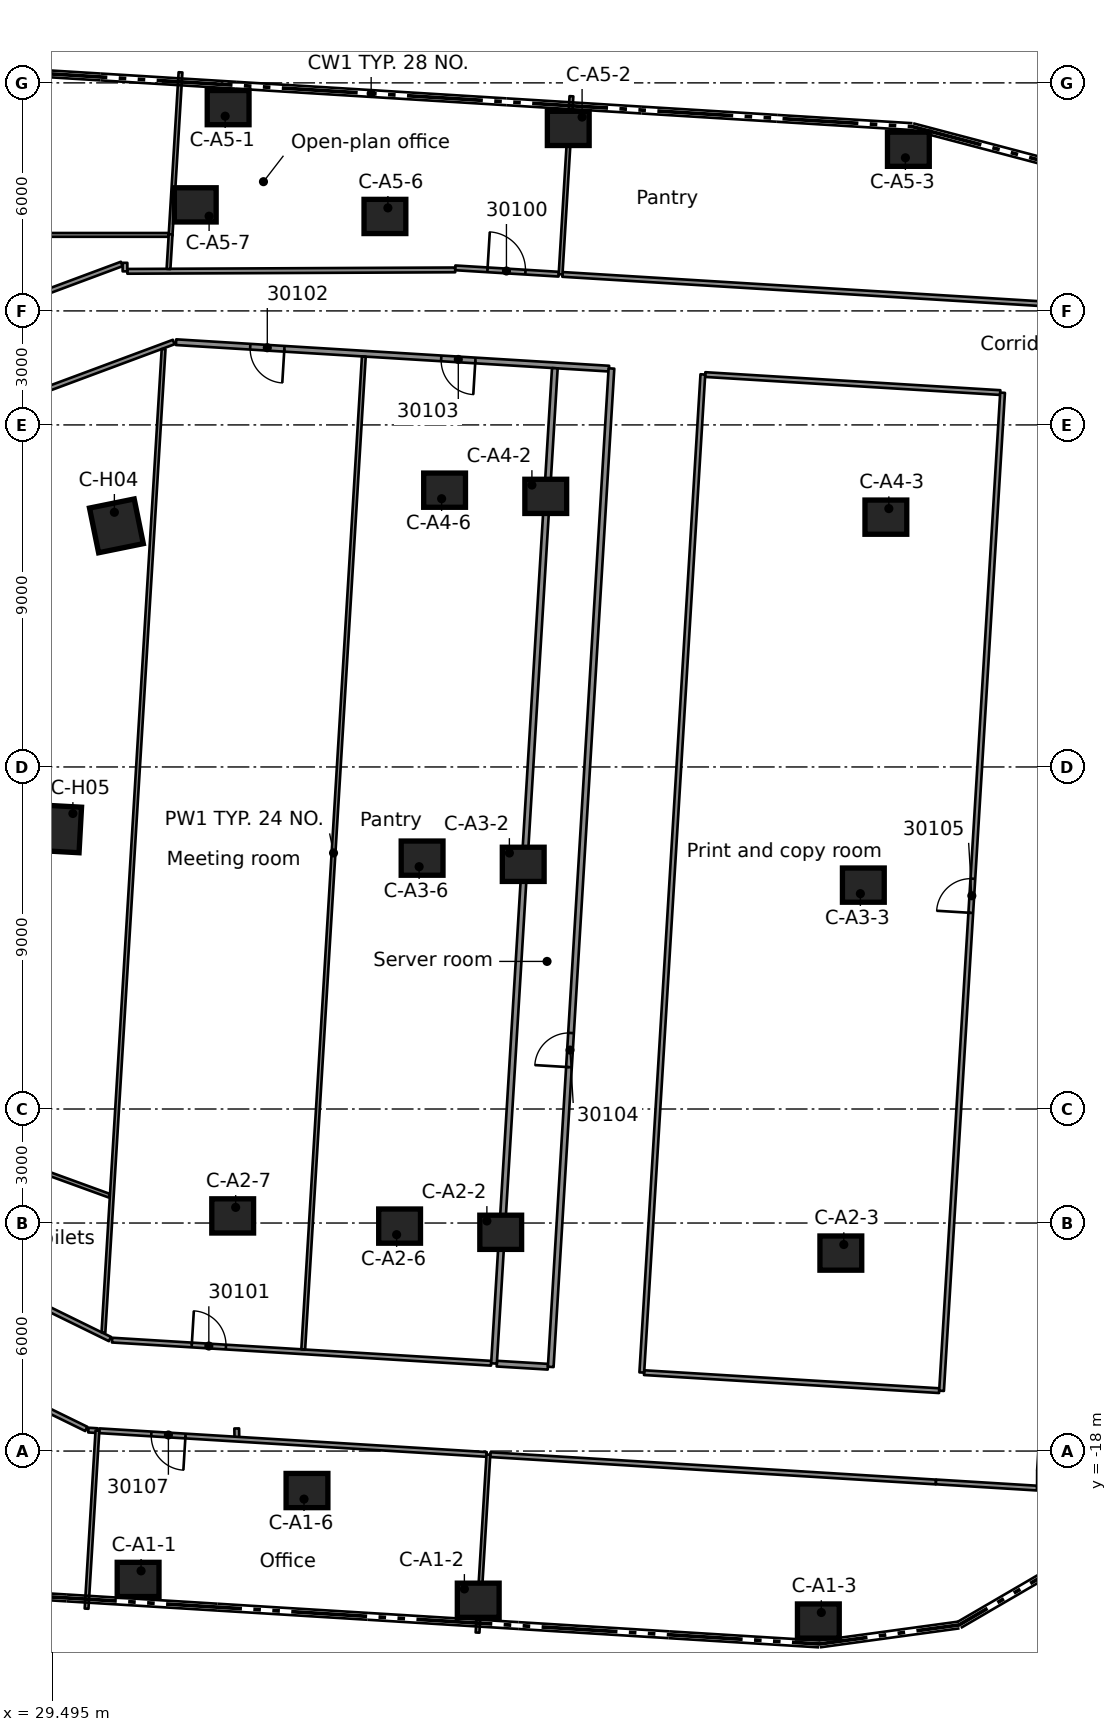
"""IFC4 building model, lengths in metres.
Left out: names, types, materials, properties, quantities, classifications, styles, units other than length and angle.
Written with IfcOpenShell. Run it as: python <this file> out.ifc"""

import sys

from ifc_helpers import new_model, si_unit, direction, frame, frame_2d, origin, origin_2d, place, context, subcontext, project, spatial, rectangle, extrude, element, fill, save


model = new_model("IFC4")
c1 = context("Model", 3, precision=1e-05, world=origin(), true_north=direction((0.0, 1.0)))
c2 = subcontext(c1, "Body", "Model", "MODEL_VIEW")
j1 = project(units=[si_unit("LENGTHUNIT", "METRE"), si_unit("PLANEANGLEUNIT", "RADIAN")], contexts=[c1])
p1 = place(None, origin())
s1 = spatial("IfcSite", under=j1, at=p1, CompositionType="ELEMENT")
p2 = place(p1, origin())
s2 = spatial("IfcBuilding", under=s1, at=p2, CompositionType="ELEMENT")
p3 = place(p2, frame((0.0, 0.0, 152.6)))
s3 = spatial("IfcBuildingStorey", under=s2, at=p3, CompositionType="ELEMENT", Elevation=152.6)
for number, where, z_axis, x_axis in (
    (1, (31.754, -21.378, 0.0), (0.0, 0.0, 1.0), (1.0, 0.0, 0.0)),
    (2, (40.704, -21.926, 0.0), (0.0, 0.0, 1.0), (1.0, 0.0, 0.0)),
    (3, (49.654, -22.473, 0.0), (0.0, 0.0, 1.0), (1.0, 0.0, 0.0)),
    (4, (36.198, -19.039, 0.0), (0.0, 0.0, 1.0), (1.0, 0.0, 0.0)),
    (5, (41.296, -12.244, 0.0), (0.0, 0.0, 1.0), (1.0, 0.0, 0.0)),
    (6, (50.246, -12.791, 0.0), (0.0, 0.0, 1.0), (1.0, 0.0, 0.0)),
    (7, (38.635, -12.081, 0.0), (0.0, 0.0, 1.0), (1.0, 0.0, 0.0)),
    (8, (34.243, -11.813, 0.0), (0.0, 0.0, 1.0), (1.0, 0.0, 0.0)),
    (9, (41.888, -2.562, 0.0), (0.0, 0.0, 1.0), (1.0, 0.0, 0.0)),
    (10, (50.838, -3.109, 0.0), (0.0, 0.0, 1.0), (1.0, 0.0, 0.0)),
    (11, (39.227, -2.399, 0.0), (0.0, 0.0, 1.0), (1.0, 0.0, 0.0)),
    (12, (42.481, 7.12, 0.0), (0.0, 0.0, 1.0), (1.0, 0.0, 0.0)),
    (13, (51.431, 6.573, 0.0), (0.0, 0.0, 1.0), (1.0, 0.0, 0.0)),
    (14, (39.819, 7.283, 0.0), (0.0, 0.0, 1.0), (1.0, 0.0, 0.0)),
    (15, (34.123, 17.349, 0.0), (0.0, 0.0, 1.0), (1.0, 0.0, 0.0)),
    (16, (43.073, 16.802, 0.0), (0.0, 0.0, 1.0), (1.0, 0.0, 0.0)),
    (17, (52.023, 16.254, 0.0), (0.0, 0.0, 1.0), (1.0, 0.0, 0.0)),
    (18, (38.249, 14.485, 0.0), (0.0, 0.0, 1.0), (1.0, 0.0, 0.0)),
    (19, (33.258, 14.79, 0.0), (0.0, 0.0, 1.0), (1.0, 0.0, 0.0)),
):
    element("IfcColumn", number, at=place(p3, frame(where, z_axis=z_axis, x_axis=x_axis)), inside=s3, PredefinedType="COLUMN", context=c2, shape_type="SweptSolid", body=[
        extrude(rectangle(XDim=1.1, YDim=0.9, at=origin_2d()), origin(), (0.0, 0.0, 1.0), 3.5),
    ])
for number, where, z_axis, x_axis in (
    (20, (31.183, 6.344, 0.0), (0.0, 0.0, 1.0), (0.98, 0.199, 0.0)),
    (21, (29.634, -1.625, 0.0), (0.0, 0.0, 1.0), (0.998, -0.055, 0.0)),
):
    element("IfcColumn", number, at=place(p3, frame(where, z_axis=z_axis, x_axis=x_axis)), inside=s3, PredefinedType="COLUMN", context=c2, shape_type="SweptSolid", body=[
        extrude(rectangle(XDim=1.2, YDim=1.2, at=origin_2d()), origin(), (0.0, 0.0, 1.0), 3.5),
    ])
p4 = place(p3, frame((34.349, -17.405, 0.0), z_axis=(0.0, 0.0, 1.0), x_axis=(0.017313421844, -0.999850111479, 0.0)))
e22 = element("IfcWall", 22, at=p4, inside=s3, PredefinedType="PARTITIONING", context=c2, shape_type="SweptSolid", body=[
    extrude(rectangle(XDim=0.282, YDim=0.125, at=frame_2d((0.141, 0.0))), origin(), (0.0, 0.0, 1.0), 3.08),
])
p5 = place(p3, frame((26.052, -15.294, 0.0), z_axis=(0.0, 0.0, 1.0), x_axis=(0.898165349965, -0.43965782618, 0.0)))
e23 = element("IfcWall", 23, at=p5, inside=s3, PredefinedType="PARTITIONING", context=c2, shape_type="SweptSolid", body=[
    extrude(rectangle(XDim=4.831, YDim=0.125, at=frame_2d((2.416, 0.0))), origin(), (0.0, 0.0, 1.0), 3.08),
])
p6 = place(p3, frame((31.014, -15.053, 0.0), z_axis=(0.0, 0.0, 1.0), x_axis=(-0.897926088568, 0.440146270538, 0.0)))
e24 = element("IfcWall", 24, at=p6, inside=s3, PredefinedType="PARTITIONING", context=c2, shape_type="SweptSolid", body=[
    extrude(rectangle(XDim=5.289, YDim=0.125, at=frame_2d((2.645, 0.0))), origin(), (0.0, 0.0, 1.0), 3.08),
])
p7 = place(p3, frame((22.131, -8.055, 0.0), z_axis=(0.0, 0.0, 1.0), x_axis=(0.939701226618, -0.341996498071, 0.0)))
e25 = element("IfcWall", 25, at=p7, inside=s3, PredefinedType="PARTITIONING", context=c2, shape_type="SweptSolid", body=[
    extrude(rectangle(XDim=9.436, YDim=0.1, at=frame_2d((4.718, 0.0))), origin(), (0.0, 0.0, 1.0), 3.08),
])
p8 = place(p3, frame((30.445, -17.448, 0.0), z_axis=(0.0, 0.0, 1.0), x_axis=(0.998064460788, -0.062187877536, 0.0)))
e26 = element("IfcWall", 26, at=p8, inside=s3, PredefinedType="PARTITIONING", context=c2, shape_type="SweptSolid", body=[
    extrude(rectangle(XDim=0.24, YDim=0.125, at=frame_2d((0.12, 0.0))), origin(), (0.0, 0.0, 1.0), 3.08),
])
p9 = place(p3, frame((41.022, -18.095, 0.0), z_axis=(0.0, 0.0, 1.0), x_axis=(0.998124844779, -0.06121106301, 0.0)))
e27 = element("IfcWall", 27, at=p9, inside=s3, PredefinedType="PARTITIONING", context=c2, shape_type="SweptSolid", body=[
    extrude(rectangle(XDim=11.746, YDim=0.125, at=frame_2d((5.873, 0.0))), origin(), (0.0, 0.0, 1.0), 3.08),
])
p10 = place(p3, frame((52.75, -18.812, 0.0), z_axis=(0.0, 0.0, 1.0), x_axis=(0.998124296611, -0.061220000931, 0.0)))
e28 = element("IfcWall", 28, at=p10, inside=s3, PredefinedType="PARTITIONING", context=c2, shape_type="SweptSolid", body=[
    extrude(rectangle(XDim=2.664, YDim=0.125, at=frame_2d((1.332, 0.0))), origin(), (0.0, 0.0, 1.0), 3.08),
])
p11 = place(p3, frame((40.923, -18.089, 0.0), z_axis=(0.0, 0.0, 1.0), x_axis=(-0.998135704692, 0.06103372034, 0.0)))
e29 = element("IfcWall", 29, at=p11, inside=s3, PredefinedType="PARTITIONING", context=c2, shape_type="SweptSolid", body=[
    extrude(rectangle(XDim=10.208, YDim=0.125, at=frame_2d((5.104, 0.0))), origin(), (0.0, 0.0, 1.0), 3.08),
])
p12 = place(p11, frame((7.938, 0.0, 0.0)))
e30 = element("IfcOpeningElement", 30, at=p12, cuts=e29, PredefinedType="OPENING", context=c2, shape_type="SweptSolid", body=[
    extrude(rectangle(XDim=0.9, YDim=2.1, at=frame_2d((0.45, 1.05))), frame((0.0, 0.073, 0.0), z_axis=(0.0, -1.0, 0.0), x_axis=(1.0, 0.0, 0.0)), (0.0, 0.0, 1.0), 0.145),
])
p13 = place(p3, frame((41.194, -15.7, 0.0), z_axis=(0.0, 0.0, 1.0), x_axis=(0.998183738246, -0.060243046918, 0.0)))
e31 = element("IfcWall", 31, at=p13, inside=s3, PredefinedType="PARTITIONING", context=c2, shape_type="SweptSolid", body=[
    extrude(rectangle(XDim=1.345, YDim=0.15, at=frame_2d((0.673, 0.0))), origin(), (0.0, 0.0, 1.0), 3.08),
])
p14 = place(p3, frame((31.07, -15.081, 0.0), z_axis=(0.0, 0.0, 1.0), x_axis=(0.998141754277, -0.060934705778, 0.0)))
e32 = element("IfcWall", 32, at=p14, inside=s3, PredefinedType="PARTITIONING", context=c2, shape_type="SweptSolid", body=[
    extrude(rectangle(XDim=9.992, YDim=0.125, at=frame_2d((4.996, 0.0))), origin(), (0.0, 0.0, 1.0), 3.08),
])
p15 = place(p14, frame((2.1, 0.0, 0.0)))
e33 = element("IfcOpeningElement", 33, at=p15, cuts=e32, PredefinedType="OPENING", context=c2, shape_type="SweptSolid", body=[
    extrude(rectangle(XDim=0.9, YDim=2.1, at=frame_2d((0.45, 1.05))), frame((0.0, 0.073, 0.0), z_axis=(0.0, -1.0, 0.0), x_axis=(1.0, 0.0, 0.0)), (0.0, 0.0, 1.0), 0.145),
])
p16 = place(p3, frame((45.07, -15.937, 0.0), z_axis=(0.0, 0.0, 1.0), x_axis=(0.998142502844, -0.060922442628, 0.0)))
e34 = element("IfcWall", 34, at=p16, inside=s3, PredefinedType="PARTITIONING", context=c2, shape_type="SweptSolid", body=[
    extrude(rectangle(XDim=7.778, YDim=0.125, at=frame_2d((3.889, 0.0))), origin(), (0.0, 0.0, 1.0), 3.08),
])
p17 = place(p3, frame((44.145, 10.481, 0.0), z_axis=(0.0, 0.0, 1.0), x_axis=(-0.998138667877, 0.06098524157, 0.0)))
e35 = element("IfcWall", 35, at=p17, inside=s3, PredefinedType="PARTITIONING", context=c2, shape_type="SweptSolid", body=[
    extrude(rectangle(XDim=11.413, YDim=0.15, at=frame_2d((5.707, 0.0))), origin(), (0.0, 0.0, 1.0), 3.08),
])
p18 = place(p17, frame((8.558, 0.0, 0.0)))
e36 = element("IfcOpeningElement", 36, at=p18, cuts=e35, PredefinedType="OPENING", context=c2, shape_type="SweptSolid", body=[
    extrude(rectangle(XDim=0.9, YDim=2.1, at=frame_2d((0.45, 1.05))), frame((0.0, 0.085, 0.0), z_axis=(0.0, -1.0, 0.0), x_axis=(1.0, 0.0, 0.0)), (0.0, 0.0, 1.0), 0.17),
])
p19 = place(p17, frame((3.523, 0.0, 0.0)))
e37 = element("IfcOpeningElement", 37, at=p19, cuts=e35, PredefinedType="OPENING", context=c2, shape_type="SweptSolid", body=[
    extrude(rectangle(XDim=0.9, YDim=2.1, at=frame_2d((0.45, 1.05))), frame((0.0, 0.085, 0.0), z_axis=(0.0, -1.0, 0.0), x_axis=(1.0, 0.0, 0.0)), (0.0, 0.0, 1.0), 0.17),
])
p20 = place(p3, frame((46.677, 10.325, 0.0), z_axis=(0.0, 0.0, 1.0), x_axis=(0.998142036778, -0.060930078101, 0.0)))
e38 = element("IfcWall", 38, at=p20, inside=s3, PredefinedType="PARTITIONING", context=c2, shape_type="SweptSolid", body=[
    extrude(rectangle(XDim=7.777, YDim=0.125, at=frame_2d((3.889, 0.0))), origin(), (0.0, 0.0, 1.0), 3.08),
])
p21 = place(p3, frame((42.921, 12.96, 0.0), z_axis=(0.0, 0.0, 1.0), x_axis=(0.998135679052, -0.061034139647, 0.0)))
e39 = element("IfcWall", 39, at=p21, inside=s3, PredefinedType="PARTITIONING", context=c2, shape_type="SweptSolid", body=[
    extrude(rectangle(XDim=13.468, YDim=0.125, at=frame_2d((6.734, 0.0))), origin(), (0.0, 0.0, 1.0), 3.08),
])
p22 = place(p3, frame((40.099, 13.133, 0.0), z_axis=(0.0, 0.0, 1.0), x_axis=(0.998123336101, -0.061235658973, 0.0)))
e40 = element("IfcWall", 40, at=p22, inside=s3, PredefinedType="PARTITIONING", context=c2, shape_type="SweptSolid", body=[
    extrude(rectangle(XDim=2.727, YDim=0.125, at=frame_2d((1.364, 0.0))), origin(), (0.0, 0.0, 1.0), 3.08),
])
p23 = place(p22, frame((0.85, 0.0, 0.0)))
e41 = element("IfcOpeningElement", 41, at=p23, cuts=e40, PredefinedType="OPENING", context=c2, shape_type="SweptSolid", body=[
    extrude(rectangle(XDim=1.0, YDim=2.1, at=frame_2d((0.5, 1.05))), frame((0.0, 0.073, 0.0), z_axis=(0.0, -1.0, 0.0), x_axis=(1.0, 0.0, 0.0)), (0.0, 0.0, 1.0), 0.145),
])
p24 = place(p3, frame((31.471, 13.041, 0.0), z_axis=(0.0, 0.0, 1.0), x_axis=(0.999990255084, 0.004414718129, 0.0)))
e42 = element("IfcWall", 42, at=p24, inside=s3, PredefinedType="PARTITIONING", context=c2, shape_type="SweptSolid", body=[
    extrude(rectangle(XDim=8.627, YDim=0.125, at=frame_2d((4.313, 0.0))), origin(), (0.0, 0.0, 1.0), 3.08),
])
p25 = place(p3, frame((22.113, 14.0, 0.0), z_axis=(0.0, 0.0, 1.0), x_axis=(1.0, 0.0, 0.0)))
e43 = element("IfcWall", 43, at=p25, inside=s3, PredefinedType="PARTITIONING", context=c2, shape_type="SweptSolid", body=[
    extrude(rectangle(XDim=10.446, YDim=0.1, at=frame_2d((5.223, 0.0))), origin(), (0.0, 0.0, 1.0), 3.08),
])
p26 = place(p3, frame((25.833, 8.63, 0.0), z_axis=(0.0, 0.0, 1.0), x_axis=(0.93725557741, 0.348643059037, 0.0)))
e44 = element("IfcWall", 44, at=p26, inside=s3, PredefinedType="PARTITIONING", context=c2, shape_type="SweptSolid", body=[
    extrude(rectangle(XDim=7.317, YDim=0.125, at=frame_2d((3.658, 0.0))), origin(), (0.0, 0.0, 1.0), 3.08),
])
p27 = place(p3, frame((25.742, 11.158, 0.0), z_axis=(0.0, 0.0, 1.0), x_axis=(0.937195672542, 0.348804058705, 0.0)))
e45 = element("IfcWall", 45, at=p27, inside=s3, PredefinedType="PARTITIONING", context=c2, shape_type="SweptSolid", body=[
    extrude(rectangle(XDim=5.955, YDim=0.125, at=frame_2d((2.978, 0.0))), origin(), (0.0, 0.0, 1.0), 3.08),
])
p28 = place(p3, frame((57.311, 11.514, 0.0), z_axis=(0.0, 0.0, 1.0), x_axis=(-0.061067487699, -0.998133639322, 0.0)))
e46 = element("IfcWall", 46, at=p28, inside=s3, PredefinedType="PARTITIONING", context=c2, shape_type="SweptSolid", body=[
    extrude(rectangle(XDim=30.08, YDim=0.125, at=frame_2d((15.04, 0.0))), origin(), (0.0, 0.0, 1.0), 3.08),
])
p29 = place(p28, frame((14.435, 0.0, 0.0)))
e47 = element("IfcOpeningElement", 47, at=p29, cuts=e46, PredefinedType="OPENING", context=c2, shape_type="SweptSolid", body=[
    extrude(rectangle(XDim=0.9, YDim=2.1, at=frame_2d((0.45, 1.05))), frame((0.0, 0.073, 0.0), z_axis=(0.0, -1.0, 0.0), x_axis=(1.0, 0.0, 0.0)), (0.0, 0.0, 1.0), 0.145),
])
p30 = place(p3, frame((52.896, -16.415, 0.0), z_axis=(0.0, 0.0, 1.0), x_axis=(0.061037428755, 0.998135477924, 0.0)))
e48 = element("IfcWall", 48, at=p30, inside=s3, PredefinedType="PARTITIONING", context=c2, shape_type="SweptSolid", body=[
    extrude(rectangle(XDim=26.311, YDim=0.125, at=frame_2d((13.156, 0.0))), origin(), (0.0, 0.0, 1.0), 3.08),
])
p31 = place(p30, frame((12.6, 0.0, 0.0)))
e49 = element("IfcOpeningElement", 49, at=p31, cuts=e48, PredefinedType="OPENING", context=c2, shape_type="SweptSolid", body=[
    extrude(rectangle(XDim=0.9, YDim=2.1, at=frame_2d((0.45, 1.05))), frame((0.0, 0.073, 0.0), z_axis=(0.0, -1.0, 0.0), x_axis=(1.0, 0.0, 0.0)), (0.0, 0.0, 1.0), 0.145),
])
p32 = place(p3, frame((45.008, -15.933, 0.0), z_axis=(0.0, 0.0, 1.0), x_axis=(0.061073840806, 0.998133250608, 0.0)))
e50 = element("IfcWall", 50, at=p32, inside=s3, PredefinedType="PARTITIONING", context=c2, shape_type="SweptSolid", body=[
    extrude(rectangle(XDim=26.311, YDim=0.125, at=frame_2d((13.156, 0.0))), origin(), (0.0, 0.0, 1.0), 3.08),
])
p33 = place(p3, frame((42.612, -15.786, 0.0), z_axis=(0.0, 0.0, 1.0), x_axis=(0.060711547525, 0.998155352637, 0.0)))
e51 = element("IfcWall", 51, at=p33, inside=s3, PredefinedType="PARTITIONING", context=c2, shape_type="SweptSolid", body=[
    extrude(rectangle(XDim=26.32, YDim=0.15, at=frame_2d((13.16, 0.0))), origin(), (0.0, 0.0, 1.0), 3.08),
])
p34 = place(p33, frame((7.902, 0.0, 0.0)))
e52 = element("IfcOpeningElement", 52, at=p34, cuts=e51, PredefinedType="OPENING", context=c2, shape_type="SweptSolid", body=[
    extrude(rectangle(XDim=0.9, YDim=2.1, at=frame_2d((0.45, 1.05))), frame((0.0, 0.085, 0.0), z_axis=(0.0, -1.0, 0.0), x_axis=(1.0, 0.0, 0.0)), (0.0, 0.0, 1.0), 0.17),
])
p35 = place(p3, frame((40.686, -22.776, 0.0), z_axis=(0.0, 0.0, 1.0), x_axis=(0.060923886766, 0.998142414699, 0.0)))
e53 = element("IfcWall", 53, at=p35, inside=s3, PredefinedType="PARTITIONING", context=c2, shape_type="SweptSolid", body=[
    extrude(rectangle(XDim=4.693, YDim=0.1, at=frame_2d((2.346, 0.0))), origin(), (0.0, 0.0, 1.0), 3.08),
])
p36 = place(p3, frame((41.119, -15.695, 0.0), z_axis=(0.0, 0.0, 1.0), x_axis=(0.061026057913, 0.998136173203, 0.0)))
e54 = element("IfcWall", 54, at=p36, inside=s3, PredefinedType="PARTITIONING", context=c2, shape_type="SweptSolid", body=[
    extrude(rectangle(XDim=26.236, YDim=0.15, at=frame_2d((13.118, 0.0))), origin(), (0.0, 0.0, 1.0), 3.08),
])
p37 = place(p3, frame((42.871, 12.963, 0.0), z_axis=(0.0, 0.0, 1.0), x_axis=(0.0609080718, 0.998143379876, 0.0)))
e55 = element("IfcWall", 55, at=p37, inside=s3, PredefinedType="PARTITIONING", context=c2, shape_type="SweptSolid", body=[
    extrude(rectangle(XDim=4.694, YDim=0.1, at=frame_2d((2.347, 0.0))), origin(), (0.0, 0.0, 1.0), 3.08),
])
p38 = place(p3, frame((36.099, -15.326, 0.0), z_axis=(0.0, 0.0, 1.0), x_axis=(0.060935779655, 0.998141688719, 0.0)))
e56 = element("IfcWall", 56, at=p38, inside=s3, PredefinedType="PARTITIONING", context=c2, shape_type="SweptSolid", body=[
    extrude(rectangle(XDim=26.175, YDim=0.1, at=frame_2d((13.087, 0.0))), origin(), (0.0, 0.0, 1.0), 3.08),
])
p39 = place(p3, frame((30.398, -22.147, 0.0), z_axis=(0.0, 0.0, 1.0), x_axis=(0.060972554319, 0.998139442974, 0.0)))
e57 = element("IfcWall", 57, at=p39, inside=s3, PredefinedType="PARTITIONING", context=c2, shape_type="SweptSolid", body=[
    extrude(rectangle(XDim=4.693, YDim=0.1, at=frame_2d((2.346, 0.0))), origin(), (0.0, 0.0, 1.0), 3.08),
])
p40 = place(p3, frame((30.842, -14.879, 0.0), z_axis=(0.0, 0.0, 1.0), x_axis=(0.061072336712, 0.998133342639, 0.0)))
e58 = element("IfcWall", 58, at=p40, inside=s3, PredefinedType="PARTITIONING", context=c2, shape_type="SweptSolid", body=[
    extrude(rectangle(XDim=25.92, YDim=0.1, at=frame_2d((12.96, 0.0))), origin(), (0.0, 0.0, 1.0), 3.08),
])
p41 = place(p3, frame((32.608, 13.985, 0.0), z_axis=(0.0, 0.0, 1.0), x_axis=(0.060978462691, 0.998139082036, 0.0)))
e59 = element("IfcWall", 59, at=p41, inside=s3, PredefinedType="PARTITIONING", context=c2, shape_type="SweptSolid", body=[
    extrude(rectangle(XDim=4.3, YDim=0.1, at=frame_2d((2.15, 0.0))), origin(), (0.0, 0.0, 1.0), 3.08),
])
p42 = place(p3, frame((32.554, 13.103, 0.0), z_axis=(0.0, 0.0, 1.0), x_axis=(0.061463226288, 0.998109348626, 0.0)))
e60 = element("IfcWall", 60, at=p42, inside=s3, PredefinedType="PARTITIONING", context=c2, shape_type="SweptSolid", body=[
    extrude(rectangle(XDim=0.914, YDim=0.1, at=frame_2d((0.457, 0.0))), origin(), (0.0, 0.0, 1.0), 3.08),
])
p43 = place(p3, frame((55.472, -18.978, 0.0), z_axis=(0.0, 0.0, 1.0), x_axis=(0.004694783941, 0.999988979441, 0.0)))
e61 = element("IfcWall", 61, at=p43, inside=s3, PredefinedType="PARTITIONING", context=c2, shape_type="SweptSolid", body=[
    extrude(rectangle(XDim=0.468, YDim=0.125, at=frame_2d((0.234, 0.0))), origin(), (0.0, 0.0, 1.0), 3.08),
])
p44 = place(p3, frame((31.409, 13.041, 0.0), z_axis=(0.0, 0.0, 1.0), x_axis=(0.0, 1.0, 0.0)))
e62 = element("IfcWall", 62, at=p44, inside=s3, PredefinedType="PARTITIONING", context=c2, shape_type="SweptSolid", body=[
    extrude(rectangle(XDim=0.224, YDim=0.125, at=frame_2d((0.112, 0.0))), origin(), (0.0, 0.0, 1.0), 3.08),
])
p45 = place(p23, origin())
e63 = element("IfcDoor", 63, at=p45, inside=s3, OperationType="SINGLE_SWING_LEFT", PredefinedType="DOOR", context=c2, shape_type="SweptSolid", body=[
    extrude(rectangle(XDim=1.0, YDim=2.1, at=frame_2d((0.5, 1.05))), frame((0.0, 0.025, 0.0), z_axis=(0.0, -1.0, 0.0), x_axis=(1.0, 0.0, 0.0)), (0.0, 0.0, 1.0), 0.05),
])
fill(e41, e63)
p46 = place(p15, origin())
e64 = element("IfcDoor", 64, at=p46, inside=s3, OperationType="SINGLE_SWING_LEFT", PredefinedType="DOOR", context=c2, shape_type="SweptSolid", body=[
    extrude(rectangle(XDim=0.9, YDim=2.1, at=frame_2d((0.45, 1.05))), frame((0.0, 0.025, 0.0), z_axis=(0.0, -1.0, 0.0), x_axis=(1.0, 0.0, 0.0)), (0.0, 0.0, 1.0), 0.05),
])
fill(e33, e64)
p47 = place(p18, origin())
e65 = element("IfcDoor", 65, at=p47, inside=s3, OperationType="SINGLE_SWING_RIGHT", PredefinedType="DOOR", context=c2, shape_type="SweptSolid", body=[
    extrude(rectangle(XDim=0.9, YDim=2.1, at=frame_2d((0.45, 1.05))), frame((0.0, 0.025, 0.0), z_axis=(0.0, -1.0, 0.0), x_axis=(1.0, 0.0, 0.0)), (0.0, 0.0, 1.0), 0.05),
])
fill(e36, e65)
p48 = place(p19, origin())
e66 = element("IfcDoor", 66, at=p48, inside=s3, OperationType="SINGLE_SWING_LEFT", PredefinedType="DOOR", context=c2, shape_type="SweptSolid", body=[
    extrude(rectangle(XDim=0.9, YDim=2.1, at=frame_2d((0.45, 1.05))), frame((0.0, 0.025, 0.0), z_axis=(0.0, -1.0, 0.0), x_axis=(1.0, 0.0, 0.0)), (0.0, 0.0, 1.0), 0.05),
])
fill(e37, e66)
p49 = place(p34, origin())
e67 = element("IfcDoor", 67, at=p49, inside=s3, OperationType="SINGLE_SWING_LEFT", PredefinedType="DOOR", context=c2, shape_type="SweptSolid", body=[
    extrude(rectangle(XDim=0.9, YDim=2.1, at=frame_2d((0.45, 1.05))), frame((0.0, 0.025, 0.0), z_axis=(0.0, -1.0, 0.0), x_axis=(1.0, 0.0, 0.0)), (0.0, 0.0, 1.0), 0.05),
])
fill(e52, e67)
p50 = place(p31, origin())
e68 = element("IfcDoor", 68, at=p50, inside=s3, OperationType="SINGLE_SWING_LEFT", PredefinedType="DOOR", context=c2, shape_type="SweptSolid", body=[
    extrude(rectangle(XDim=0.9, YDim=2.1, at=frame_2d((0.45, 1.05))), frame((0.0, 0.025, 0.0), z_axis=(0.0, -1.0, 0.0), x_axis=(1.0, 0.0, 0.0)), (0.0, 0.0, 1.0), 0.05),
])
fill(e49, e68)
p51 = place(p12, origin())
e69 = element("IfcDoor", 69, at=p51, inside=s3, OperationType="SINGLE_SWING_RIGHT", PredefinedType="DOOR", context=c2, shape_type="SweptSolid", body=[
    extrude(rectangle(XDim=0.9, YDim=2.1, at=frame_2d((0.45, 1.05))), frame((0.0, 0.025, 0.0), z_axis=(0.0, -1.0, 0.0), x_axis=(1.0, 0.0, 0.0)), (0.0, 0.0, 1.0), 0.05),
])
fill(e30, e69)
save(model, sys.argv[1])
